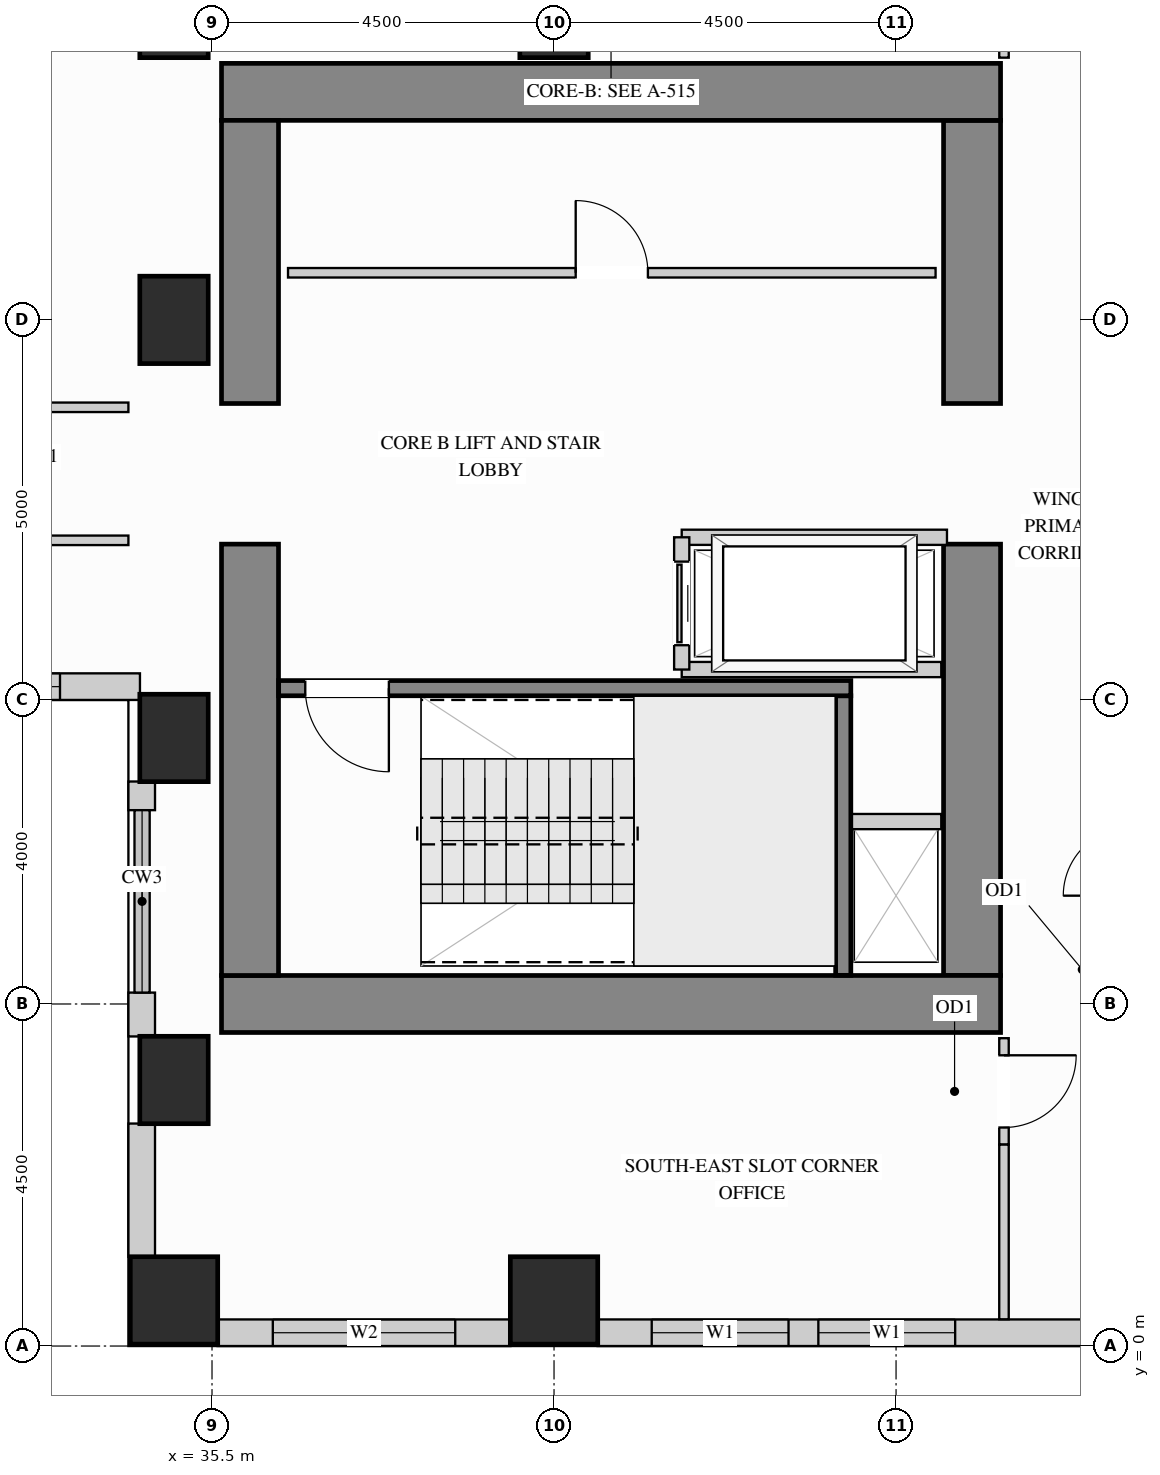
"""IFC4 building model, lengths in metres.
Left out: names, types, materials, properties, quantities, classifications, styles, units other than length and angle.
Written with IfcOpenShell. Run it as: python <this file> out.ifc"""

import sys

from ifc_helpers import new_model, si_unit, direction, frame, frame_2d, origin, origin_2d, place, context, subcontext, project, spatial, rectangle, extrude, source, transform, mapped, element, fill, save


model = new_model("IFC4")
c1 = context("Model", 3, precision=1e-05, world=origin(), true_north=direction((0.0, 1.0)))
c2 = subcontext(c1, "Body", "Model", "MODEL_VIEW")
j1 = project(units=[si_unit("LENGTHUNIT", "METRE"), si_unit("PLANEANGLEUNIT", "RADIAN")], contexts=[c1])
p1 = place(None, origin())
s1 = spatial("IfcSite", under=j1, at=p1, CompositionType="ELEMENT")
p2 = place(p1, origin())
s2 = spatial("IfcBuilding", under=s1, at=p2, CompositionType="ELEMENT")
p3 = place(p2, frame((0.0, 0.0, 102.6)))
s3 = spatial("IfcBuildingStorey", under=s2, at=p3, CompositionType="ELEMENT", Elevation=102.6)
m1 = source(origin(), c2, "Body", "SweptSolid", [
    extrude(rectangle(XDim=0.9, YDim=0.9, at=origin_2d()), origin(), (0.0, 0.0, 1.0), 3.38),
])
for number, where, z_axis, x_axis in (
    (1, (35.0, 17.4, 0.0), (0.0, 0.0, 1.0), (1.0, 0.0, 0.0)),
    (2, (40.0, 17.4, 0.0), (0.0, 0.0, 1.0), (1.0, 0.0, 0.0)),
):
    element("IfcColumn", number, at=place(p3, frame(where, z_axis=z_axis, x_axis=x_axis)), inside=s3, PredefinedType="COLUMN", context=c2, shape_type="MappedRepresentation", body=[
        mapped(m1, transform((0.0, 0.0, 0.0), x_axis=(1.0, 0.0, 0.0), y_axis=(0.0, 1.0, 0.0), z_axis=(0.0, 0.0, 1.0))),
    ])
m2 = source(origin(), c2, "Body", "SweptSolid", [
    extrude(rectangle(XDim=0.9, YDim=1.15, at=origin_2d()), origin(), (0.0, 0.0, 1.0), 3.38),
])
for number, where, z_axis, x_axis in (
    (3, (35.0, 13.5, 0.0), (0.0, 0.0, 1.0), (1.0, 0.0, 0.0)),
    (4, (35.0, 3.5, 0.0), (0.0, 0.0, 1.0), (1.0, 0.0, 0.0)),
    (5, (35.0, 8.0, 0.0), (0.0, 0.0, 1.0), (1.0, 0.0, 0.0)),
):
    element("IfcColumn", number, at=place(p3, frame(where, z_axis=z_axis, x_axis=x_axis)), inside=s3, PredefinedType="COLUMN", context=c2, shape_type="MappedRepresentation", body=[
        mapped(m2, transform((0.0, 0.0, 0.0), x_axis=(1.0, 0.0, 0.0), y_axis=(0.0, 1.0, 0.0), z_axis=(0.0, 0.0, 1.0))),
    ])
m3 = source(origin(), c2, "Body", "SweptSolid", [
    extrude(rectangle(XDim=1.15, YDim=1.15, at=origin_2d()), origin(), (0.0, 0.0, 1.0), 3.38),
])
for number, where, z_axis, x_axis in (
    (6, (35.0, 0.6, 0.0), (0.0, 0.0, 1.0), (1.0, 0.0, 0.0)),
    (7, (40.0, 0.6, 0.0), (0.0, 0.0, 1.0), (1.0, 0.0, 0.0)),
):
    element("IfcColumn", number, at=place(p3, frame(where, z_axis=z_axis, x_axis=x_axis)), inside=s3, PredefinedType="COLUMN", context=c2, shape_type="MappedRepresentation", body=[
        mapped(m3, transform((0.0, 0.0, 0.0), x_axis=(1.0, 0.0, 0.0), y_axis=(0.0, 1.0, 0.0), z_axis=(0.0, 0.0, 1.0))),
    ])
m4 = source(origin(), c2, "Body", "SweptSolid", [
    extrude(rectangle(XDim=5.675, YDim=0.75, at=frame_2d((2.837, 0.0))), origin(), (0.0, 0.0, 1.0), 3.38),
])
p4 = place(p3, frame((45.5, 4.875, 0.0), z_axis=(0.0, 0.0, 1.0), x_axis=(0.0, 1.0, 0.0)))
e8 = element("IfcWall", 8, at=p4, inside=s3, PredefinedType="SHEAR", context=c2, shape_type="MappedRepresentation", body=[
    mapped(m4, transform((0.0, 0.0, 0.0), x_axis=(1.0, 0.0, 0.0), y_axis=(0.0, 1.0, 0.0), z_axis=(0.0, 0.0, 1.0))),
])
m5 = source(origin(), c2, "Body", "SweptSolid", [
    extrude(rectangle(XDim=3.725, YDim=0.75, at=frame_2d((1.863, 0.0))), origin(), (0.0, 0.0, 1.0), 3.38),
])
p5 = place(p3, frame((45.5, 12.4, 0.0), z_axis=(0.0, 0.0, 1.0), x_axis=(0.0, 1.0, 0.0)))
e9 = element("IfcWall", 9, at=p5, inside=s3, PredefinedType="SHEAR", context=c2, shape_type="MappedRepresentation", body=[
    mapped(m5, transform((0.0, 0.0, 0.0), x_axis=(1.0, 0.0, 0.0), y_axis=(0.0, 1.0, 0.0), z_axis=(0.0, 0.0, 1.0))),
])
m6 = source(origin(), c2, "Body", "SweptSolid", [
    extrude(rectangle(XDim=10.25, YDim=0.75, at=frame_2d((5.125, 0.0))), origin(), (0.0, 0.0, 1.0), 3.38),
])
for number, where, z_axis, x_axis in (
    (10, (35.625, 16.5, 0.0), (0.0, 0.0, 1.0), (1.0, 0.0, 0.0)),
    (11, (35.625, 4.5, 0.0), (0.0, 0.0, 1.0), (1.0, 0.0, 0.0)),
):
    element("IfcWall", number, at=place(p3, frame(where, z_axis=z_axis, x_axis=x_axis)), inside=s3, PredefinedType="SHEAR", context=c2, shape_type="MappedRepresentation", body=[
        mapped(m6, transform((0.0, 0.0, 0.0), x_axis=(1.0, 0.0, 0.0), y_axis=(0.0, 1.0, 0.0), z_axis=(0.0, 0.0, 1.0))),
    ])
p6 = place(p3, frame((36.0, 4.875, 0.0), z_axis=(0.0, 0.0, 1.0), x_axis=(0.0, 1.0, 0.0)))
e12 = element("IfcWall", 12, at=p6, inside=s3, PredefinedType="SHEAR", context=c2, shape_type="MappedRepresentation", body=[
    mapped(m4, transform((0.0, 0.0, 0.0), x_axis=(1.0, 0.0, 0.0), y_axis=(0.0, 1.0, 0.0), z_axis=(0.0, 0.0, 1.0))),
])
p7 = place(p3, frame((36.0, 12.4, 0.0), z_axis=(0.0, 0.0, 1.0), x_axis=(0.0, 1.0, 0.0)))
e13 = element("IfcWall", 13, at=p7, inside=s3, PredefinedType="SHEAR", context=c2, shape_type="MappedRepresentation", body=[
    mapped(m5, transform((0.0, 0.0, 0.0), x_axis=(1.0, 0.0, 0.0), y_axis=(0.0, 1.0, 0.0), z_axis=(0.0, 0.0, 1.0))),
])
p8 = place(p3, frame((30.948, 8.675, 0.0), z_axis=(0.0, 0.0, 1.0), x_axis=(1.0, 0.0, 0.0)))
e14 = element("IfcWall", 14, at=p8, inside=s3, PredefinedType="SOLIDWALL", context=c2, shape_type="SweptSolid", body=[
    extrude(rectangle(XDim=3.604, YDim=0.35, at=frame_2d((1.802, 0.0))), origin(), (0.0, 0.0, 1.0), 3.365),
])
p9 = place(p8, frame((1.052, 0.0, 0.78)))
e15 = element("IfcOpeningElement", 15, at=p9, cuts=e14, PredefinedType="OPENING", context=c2, shape_type="SweptSolid", body=[
    extrude(rectangle(XDim=1.5, YDim=2.0, at=frame_2d((0.75, 1.0))), frame((0.0, 0.185, 0.0), z_axis=(0.0, -1.0, 0.0), x_axis=(1.0, 0.0, 0.0)), (0.0, 0.0, 1.0), 0.37),
])
m7 = source(origin(), c2, "Body", "SweptSolid", [
    extrude(rectangle(XDim=0.377, YDim=0.35, at=frame_2d((0.188, 0.0))), origin(), (0.0, 0.0, 1.0), 3.365),
])
p10 = place(p3, frame((34.575, 7.427, 0.0), z_axis=(0.0, 0.0, 1.0), x_axis=(0.0, -1.0, 0.0)))
e16 = element("IfcWall", 16, at=p10, inside=s3, PredefinedType="SOLIDWALL", context=c2, shape_type="MappedRepresentation", body=[
    mapped(m7, transform((0.0, 0.0, 0.0), x_axis=(1.0, 0.0, 0.0), y_axis=(0.0, 1.0, 0.0), z_axis=(0.0, 0.0, 1.0))),
])
m8 = source(origin(), c2, "Body", "SweptSolid", [
    extrude(rectangle(XDim=0.577, YDim=0.35, at=frame_2d((0.289, 0.0))), origin(), (0.0, 0.0, 1.0), 3.365),
])
p11 = place(p3, frame((34.575, 4.65, 0.0), z_axis=(0.0, 0.0, 1.0), x_axis=(0.0, -1.0, 0.0)))
e17 = element("IfcWall", 17, at=p11, inside=s3, PredefinedType="SOLIDWALL", context=c2, shape_type="MappedRepresentation", body=[
    mapped(m8, transform((0.0, 0.0, 0.0), x_axis=(1.0, 0.0, 0.0), y_axis=(0.0, 1.0, 0.0), z_axis=(0.0, 0.0, 1.0))),
])
m9 = source(origin(), c2, "Body", "SweptSolid", [
    extrude(rectangle(XDim=1.754, YDim=0.35, at=frame_2d((0.877, 0.0))), origin(), (0.0, 0.0, 1.0), 3.365),
])
p12 = place(p3, frame((34.575, 2.927, 0.0), z_axis=(0.0, 0.0, 1.0), x_axis=(0.0, -1.0, 0.0)))
e18 = element("IfcWall", 18, at=p12, inside=s3, PredefinedType="SOLIDWALL", context=c2, shape_type="MappedRepresentation", body=[
    mapped(m9, transform((0.0, 0.0, 0.0), x_axis=(1.0, 0.0, 0.0), y_axis=(0.0, 1.0, 0.0), z_axis=(0.0, 0.0, 1.0))),
])
p13 = place(p3, frame((35.573, 0.175, 0.0), z_axis=(0.0, 0.0, 1.0), x_axis=(1.0, 0.0, 0.0)))
e19 = element("IfcWall", 19, at=p13, inside=s3, PredefinedType="SOLIDWALL", context=c2, shape_type="SweptSolid", body=[
    extrude(rectangle(XDim=3.854, YDim=0.35, at=frame_2d((1.927, 0.0))), origin(), (0.0, 0.0, 1.0), 2.428),
])
p14 = place(p13, frame((0.727, 0.0, 0.78)))
e20 = element("IfcOpeningElement", 20, at=p14, cuts=e19, PredefinedType="OPENING", context=c2, shape_type="SweptSolid", body=[
    extrude(rectangle(XDim=2.4, YDim=1.468, at=frame_2d((1.2, 0.734))), frame((0.0, 0.185, 0.0), z_axis=(0.0, -1.0, 0.0), x_axis=(1.0, 0.0, 0.0)), (0.0, 0.0, 1.0), 0.37),
])
p15 = place(p3, frame((40.573, 0.175, 0.0), z_axis=(0.0, 0.0, 1.0), x_axis=(1.0, 0.0, 0.0)))
e21 = element("IfcWall", 21, at=p15, inside=s3, PredefinedType="SOLIDWALL", context=c2, shape_type="SweptSolid", body=[
    extrude(rectangle(XDim=6.454, YDim=0.35, at=frame_2d((3.227, 0.0))), origin(), (0.0, 0.0, 1.0), 2.428),
])
p16 = place(p15, frame((0.712, 0.0, 0.78)))
e22 = element("IfcOpeningElement", 22, at=p16, cuts=e21, PredefinedType="OPENING", context=c2, shape_type="SweptSolid", body=[
    extrude(rectangle(XDim=1.8, YDim=1.468, at=frame_2d((0.9, 0.734))), frame((0.0, 0.185, 0.0), z_axis=(0.0, -1.0, 0.0), x_axis=(1.0, 0.0, 0.0)), (0.0, 0.0, 1.0), 0.37),
])
p17 = place(p15, frame((2.905, 0.0, 0.78)))
e23 = element("IfcOpeningElement", 23, at=p17, cuts=e21, PredefinedType="OPENING", context=c2, shape_type="SweptSolid", body=[
    extrude(rectangle(XDim=1.8, YDim=1.468, at=frame_2d((0.9, 0.734))), frame((0.0, 0.185, 0.0), z_axis=(0.0, -1.0, 0.0), x_axis=(1.0, 0.0, 0.0)), (0.0, 0.0, 1.0), 0.37),
])
p18 = place(p3, frame((36.5, 14.12, 0.0), z_axis=(0.0, 0.0, 1.0), x_axis=(1.0, 0.0, 0.0)))
e24 = element("IfcWall", 24, at=p18, inside=s3, PredefinedType="PARTITIONING", context=c2, shape_type="SweptSolid", body=[
    extrude(rectangle(XDim=8.52, YDim=0.125, at=frame_2d((4.26, 0.0))), origin(), (0.0, 0.0, 1.0), 3.365),
])
p19 = place(p18, frame((3.785, 0.0, 0.0)))
e25 = element("IfcOpeningElement", 25, at=p19, cuts=e24, PredefinedType="OPENING", context=c2, shape_type="SweptSolid", body=[
    extrude(rectangle(XDim=0.95, YDim=2.15, at=frame_2d((0.475, 1.075))), frame((0.0, 0.073, 0.0), z_axis=(0.0, -1.0, 0.0), x_axis=(1.0, 0.0, 0.0)), (0.0, 0.0, 1.0), 0.145),
])
p20 = place(p3, frame((45.92, 16.95, 0.0), z_axis=(0.0, 0.0, 1.0), x_axis=(0.0, 1.0, 0.0)))
e26 = element("IfcWall", 26, at=p20, inside=s3, PredefinedType="PARTITIONING", context=c2, shape_type="SweptSolid", body=[
    extrude(rectangle(XDim=2.9, YDim=0.125, at=frame_2d((1.45, 0.0))), origin(), (0.0, 0.0, 1.0), 3.365),
])
p21 = place(p20, frame((1.543, 0.0, 0.0)))
e27 = element("IfcOpeningElement", 27, at=p21, cuts=e26, PredefinedType="OPENING", context=c2, shape_type="SweptSolid", body=[
    extrude(rectangle(XDim=0.95, YDim=2.15, at=frame_2d((0.475, 1.075))), frame((0.0, 0.073, 0.0), z_axis=(0.0, -1.0, 0.0), x_axis=(1.0, 0.0, 0.0)), (0.0, 0.0, 1.0), 0.145),
])
p22 = place(p3, frame((45.92, 2.65, 0.0), z_axis=(0.0, 0.0, 1.0), x_axis=(0.0, 1.0, 0.0)))
e28 = element("IfcWall", 28, at=p22, inside=s3, PredefinedType="PARTITIONING", context=c2, shape_type="SweptSolid", body=[
    extrude(rectangle(XDim=1.4, YDim=0.125, at=frame_2d((0.7, 0.0))), origin(), (0.0, 0.0, 1.0), 3.365),
])
p23 = place(p22, frame((0.225, 0.0, 0.0)))
e29 = element("IfcOpeningElement", 29, at=p23, cuts=e28, PredefinedType="OPENING", context=c2, shape_type="SweptSolid", body=[
    extrude(rectangle(XDim=0.95, YDim=2.15, at=frame_2d((0.475, 1.075))), frame((0.0, 0.073, 0.0), z_axis=(0.0, -1.0, 0.0), x_axis=(1.0, 0.0, 0.0)), (0.0, 0.0, 1.0), 0.145),
])
m10 = source(origin(), c2, "Body", "SweptSolid", [
    extrude(rectangle(XDim=2.298, YDim=0.125, at=frame_2d((1.149, 0.0))), origin(), (0.0, 0.0, 1.0), 3.365),
])
p24 = place(p3, frame((45.92, 0.352, 0.0), z_axis=(0.0, 0.0, 1.0), x_axis=(0.0, 1.0, 0.0)))
e30 = element("IfcWall", 30, at=p24, inside=s3, PredefinedType="PARTITIONING", context=c2, shape_type="MappedRepresentation", body=[
    mapped(m10, transform((0.0, 0.0, 0.0), x_axis=(1.0, 0.0, 0.0), y_axis=(0.0, 1.0, 0.0), z_axis=(0.0, 0.0, 1.0))),
])
p25 = place(p3, frame((29.85, 12.35, 0.0), z_axis=(0.0, 0.0, 1.0), x_axis=(1.0, 0.0, 0.0)))
e31 = element("IfcWall", 31, at=p25, inside=s3, PredefinedType="PARTITIONING", context=c2, shape_type="SweptSolid", body=[
    extrude(rectangle(XDim=4.55, YDim=0.125, at=frame_2d((2.275, 0.0))), origin(), (0.0, 0.0, 1.0), 3.365),
])
p26 = place(p25, frame((1.8, 0.0, 0.0)))
e32 = element("IfcOpeningElement", 32, at=p26, cuts=e31, PredefinedType="OPENING", context=c2, shape_type="SweptSolid", body=[
    extrude(rectangle(XDim=0.95, YDim=2.15, at=frame_2d((0.475, 1.075))), frame((0.0, 0.073, 0.0), z_axis=(0.0, -1.0, 0.0), x_axis=(1.0, 0.0, 0.0)), (0.0, 0.0, 1.0), 0.145),
])
p27 = place(p3, frame((26.95, 10.6, 0.0), z_axis=(0.0, 0.0, 1.0), x_axis=(1.0, 0.0, 0.0)))
e33 = element("IfcWall", 33, at=p27, inside=s3, PredefinedType="PARTITIONING", context=c2, shape_type="SweptSolid", body=[
    extrude(rectangle(XDim=7.45, YDim=0.125, at=frame_2d((3.725, 0.0))), origin(), (0.0, 0.0, 1.0), 3.365),
])
p28 = place(p27, frame((4.683, 0.0, 0.0)))
e34 = element("IfcOpeningElement", 34, at=p28, cuts=e33, PredefinedType="OPENING", context=c2, shape_type="SweptSolid", body=[
    extrude(rectangle(XDim=0.95, YDim=2.15, at=frame_2d((0.475, 1.075))), frame((0.0, 0.073, 0.0), z_axis=(0.0, -1.0, 0.0), x_axis=(1.0, 0.0, 0.0)), (0.0, 0.0, 1.0), 0.145),
])
m11 = source(origin(), c2, "Body", "SweptSolid", [
    extrude(rectangle(XDim=1.245, YDim=0.2, at=frame_2d((0.623, 0.0))), origin(), (0.0, 0.0, 1.0), 3.365),
])
p29 = place(p3, frame((43.85, 6.9, 0.0), z_axis=(0.0, 0.0, 1.0), x_axis=(1.0, 0.0, 0.0)))
e35 = element("IfcWall", 35, at=p29, inside=s3, PredefinedType="PARTITIONING", context=c2, shape_type="MappedRepresentation", body=[
    mapped(m11, transform((0.0, 0.0, 0.0), x_axis=(1.0, 0.0, 0.0), y_axis=(0.0, 1.0, 0.0), z_axis=(0.0, 0.0, 1.0))),
])
m12 = source(origin(), c2, "Body", "SweptSolid", [
    extrude(rectangle(XDim=3.49, YDim=0.2, at=frame_2d((1.745, 0.0))), origin(), (0.0, 0.0, 1.0), 3.365),
])
p30 = place(p3, frame((41.68, 10.64, 0.0), z_axis=(0.0, 0.0, 1.0), x_axis=(1.0, 0.0, 0.0)))
e36 = element("IfcWall", 36, at=p30, inside=s3, PredefinedType="PARTITIONING", context=c2, shape_type="MappedRepresentation", body=[
    mapped(m12, transform((0.0, 0.0, 0.0), x_axis=(1.0, 0.0, 0.0), y_axis=(0.0, 1.0, 0.0), z_axis=(0.0, 0.0, 1.0))),
])
m13 = source(origin(), c2, "Body", "SweptSolid", [
    extrude(rectangle(XDim=3.415, YDim=0.2, at=frame_2d((1.708, 0.0))), origin(), (0.0, 0.0, 1.0), 3.365),
])
p31 = place(p3, frame((41.68, 8.9, 0.0), z_axis=(0.0, 0.0, 1.0), x_axis=(1.0, 0.0, 0.0)))
e37 = element("IfcWall", 37, at=p31, inside=s3, PredefinedType="PARTITIONING", context=c2, shape_type="MappedRepresentation", body=[
    mapped(m13, transform((0.0, 0.0, 0.0), x_axis=(1.0, 0.0, 0.0), y_axis=(0.0, 1.0, 0.0), z_axis=(0.0, 0.0, 1.0))),
])
p32 = place(p3, frame((41.68, 8.9, 0.0), z_axis=(0.0, 0.0, 1.0), x_axis=(0.0, 1.0, 0.0)))
e38 = element("IfcWall", 38, at=p32, inside=s3, PredefinedType="PARTITIONING", context=c2, shape_type="SweptSolid", body=[
    extrude(rectangle(XDim=1.74, YDim=0.2, at=frame_2d((0.87, 0.0))), origin(), (0.0, 0.0, 1.0), 3.365),
])
p33 = place(p32, frame((0.32, 0.0, 0.0)))
e39 = element("IfcOpeningElement", 39, at=p33, cuts=e38, PredefinedType="OPENING", context=c2, shape_type="SweptSolid", body=[
    extrude(rectangle(XDim=1.1, YDim=2.2, at=frame_2d((0.55, 1.1))), frame((0.0, 0.11, 0.0), z_axis=(0.0, -1.0, 0.0), x_axis=(1.0, 0.0, 0.0)), (0.0, 0.0, 1.0), 0.22),
])
m14 = source(origin(), c2, "Body", "SweptSolid", [
    extrude(rectangle(XDim=3.678, YDim=0.2, at=frame_2d((1.839, 0.0))), origin(), (0.0, 0.0, 1.0), 3.38),
])
p34 = place(p3, frame((43.805, 4.877, 0.0), z_axis=(0.0, 0.0, 1.0), x_axis=(0.0, 1.0, 0.0)))
e40 = element("IfcWall", 40, at=p34, inside=s3, PredefinedType="SHEAR", context=c2, shape_type="MappedRepresentation", body=[
    mapped(m14, transform((0.0, 0.0, 0.0), x_axis=(1.0, 0.0, 0.0), y_axis=(0.0, 1.0, 0.0), z_axis=(0.0, 0.0, 1.0))),
])
p35 = place(p3, frame((36.377, 8.655, 0.0), z_axis=(0.0, 0.0, 1.0), x_axis=(1.0, 0.0, 0.0)))
e41 = element("IfcWall", 41, at=p35, inside=s3, PredefinedType="SHEAR", context=c2, shape_type="SweptSolid", body=[
    extrude(rectangle(XDim=7.528, YDim=0.2, at=frame_2d((3.764, 0.0))), origin(), (0.0, 0.0, 1.0), 3.38),
])
p36 = place(p35, frame((0.35, 0.0, 0.0)))
e42 = element("IfcOpeningElement", 42, at=p36, cuts=e41, PredefinedType="OPENING", context=c2, shape_type="SweptSolid", body=[
    extrude(rectangle(XDim=1.1, YDim=2.15, at=frame_2d((0.55, 1.075))), frame((0.0, 0.11, 0.0), z_axis=(0.0, -1.0, 0.0), x_axis=(1.0, 0.0, 0.0)), (0.0, 0.0, 1.0), 0.22),
])
m15 = source(origin(), c2, "Body", "SweptSolid", [
    extrude(rectangle(XDim=1.1, YDim=2.2, at=frame_2d((0.55, 1.1))), frame((0.0, 0.025, 0.0), z_axis=(0.0, -1.0, 0.0), x_axis=(1.0, 0.0, 0.0)), (0.0, 0.0, 1.0), 0.05),
])
p37 = place(p33, origin())
e43 = element("IfcDoor", 43, at=p37, inside=s3, OperationType="SLIDING_TO_LEFT", PredefinedType="DOOR", context=c2, shape_type="MappedRepresentation", body=[
    mapped(m15, transform((0.0, 0.0, 0.0), x_axis=(1.0, 0.0, 0.0), y_axis=(0.0, 1.0, 0.0), z_axis=(0.0, 0.0, 1.0))),
])
fill(e39, e43)
m16 = source(origin(), c2, "Body", "SweptSolid", [
    extrude(rectangle(XDim=0.95, YDim=2.15, at=frame_2d((0.475, 1.075))), frame((0.0, 0.025, 0.0), z_axis=(0.0, -1.0, 0.0), x_axis=(1.0, 0.0, 0.0)), (0.0, 0.0, 1.0), 0.05),
])
p38 = place(p19, origin())
e44 = element("IfcDoor", 44, at=p38, inside=s3, OperationType="SINGLE_SWING_LEFT", PredefinedType="DOOR", context=c2, shape_type="MappedRepresentation", body=[
    mapped(m16, transform((0.0, 0.0, 0.0), x_axis=(1.0, 0.0, 0.0), y_axis=(0.0, 1.0, 0.0), z_axis=(0.0, 0.0, 1.0))),
])
fill(e25, e44)
p39 = place(p23, origin())
e45 = element("IfcDoor", 45, at=p39, inside=s3, OperationType="SINGLE_SWING_RIGHT", PredefinedType="DOOR", context=c2, shape_type="MappedRepresentation", body=[
    mapped(m16, transform((0.0, 0.0, 0.0), x_axis=(1.0, 0.0, 0.0), y_axis=(0.0, 1.0, 0.0), z_axis=(0.0, 0.0, 1.0))),
])
fill(e29, e45)
m17 = source(origin(), c2, "Body", "SweptSolid", [
    extrude(rectangle(XDim=1.1, YDim=2.15, at=frame_2d((0.55, 1.075))), frame((0.0, 0.025, 0.0), z_axis=(0.0, -1.0, 0.0), x_axis=(1.0, 0.0, 0.0)), (0.0, 0.0, 1.0), 0.05),
])
p40 = place(p36, origin())
e46 = element("IfcDoor", 46, at=p40, inside=s3, OperationType="SINGLE_SWING_RIGHT", PredefinedType="DOOR", context=c2, shape_type="MappedRepresentation", body=[
    mapped(m17, transform((0.0, 0.0, 0.0), x_axis=(1.0, 0.0, 0.0), y_axis=(0.0, 1.0, 0.0), z_axis=(0.0, 0.0, 1.0))),
])
fill(e42, e46)
m18 = source(origin(), c2, "Body", "SweptSolid", [
    extrude(rectangle(XDim=1.8, YDim=1.468, at=frame_2d((0.9, 0.734))), frame((0.0, 0.03, 0.0), z_axis=(0.0, -1.0, 0.0), x_axis=(1.0, 0.0, 0.0)), (0.0, 0.0, 1.0), 0.06),
])
p41 = place(p16, origin())
e47 = element("IfcWindow", 47, at=p41, inside=s3, PartitioningType="SINGLE_PANEL", PredefinedType="WINDOW", context=c2, shape_type="MappedRepresentation", body=[
    mapped(m18, transform((0.0, 0.0, 0.0), x_axis=(1.0, 0.0, 0.0), y_axis=(0.0, 1.0, 0.0), z_axis=(0.0, 0.0, 1.0))),
])
fill(e22, e47)
p42 = place(p17, origin())
e48 = element("IfcWindow", 48, at=p42, inside=s3, PartitioningType="SINGLE_PANEL", PredefinedType="WINDOW", context=c2, shape_type="MappedRepresentation", body=[
    mapped(m18, transform((0.0, 0.0, 0.0), x_axis=(1.0, 0.0, 0.0), y_axis=(0.0, 1.0, 0.0), z_axis=(0.0, 0.0, 1.0))),
])
fill(e23, e48)
m19 = source(origin(), c2, "Body", "SweptSolid", [
    extrude(rectangle(XDim=2.4, YDim=1.468, at=frame_2d((1.2, 0.734))), frame((0.0, 0.03, 0.0), z_axis=(0.0, -1.0, 0.0), x_axis=(1.0, 0.0, 0.0)), (0.0, 0.0, 1.0), 0.06),
])
p43 = place(p14, origin())
e49 = element("IfcWindow", 49, at=p43, inside=s3, PartitioningType="SINGLE_PANEL", PredefinedType="WINDOW", context=c2, shape_type="MappedRepresentation", body=[
    mapped(m19, transform((0.0, 0.0, 0.0), x_axis=(1.0, 0.0, 0.0), y_axis=(0.0, 1.0, 0.0), z_axis=(0.0, 0.0, 1.0))),
])
fill(e20, e49)
m20 = source(origin(), c2, "Body", "SweptSolid", [
    extrude(rectangle(XDim=1.5, YDim=2.0, at=frame_2d((0.75, 1.0))), frame((0.0, 0.03, 0.0), z_axis=(0.0, -1.0, 0.0), x_axis=(1.0, 0.0, 0.0)), (0.0, 0.0, 1.0), 0.06),
])
p44 = place(p9, origin())
e50 = element("IfcWindow", 50, at=p44, inside=s3, PartitioningType="SINGLE_PANEL", PredefinedType="WINDOW", context=c2, shape_type="MappedRepresentation", body=[
    mapped(m20, transform((0.0, 0.0, 0.0), x_axis=(1.0, 0.0, 0.0), y_axis=(0.0, 1.0, 0.0), z_axis=(0.0, 0.0, 1.0))),
])
fill(e15, e50)
save(model, sys.argv[1])
